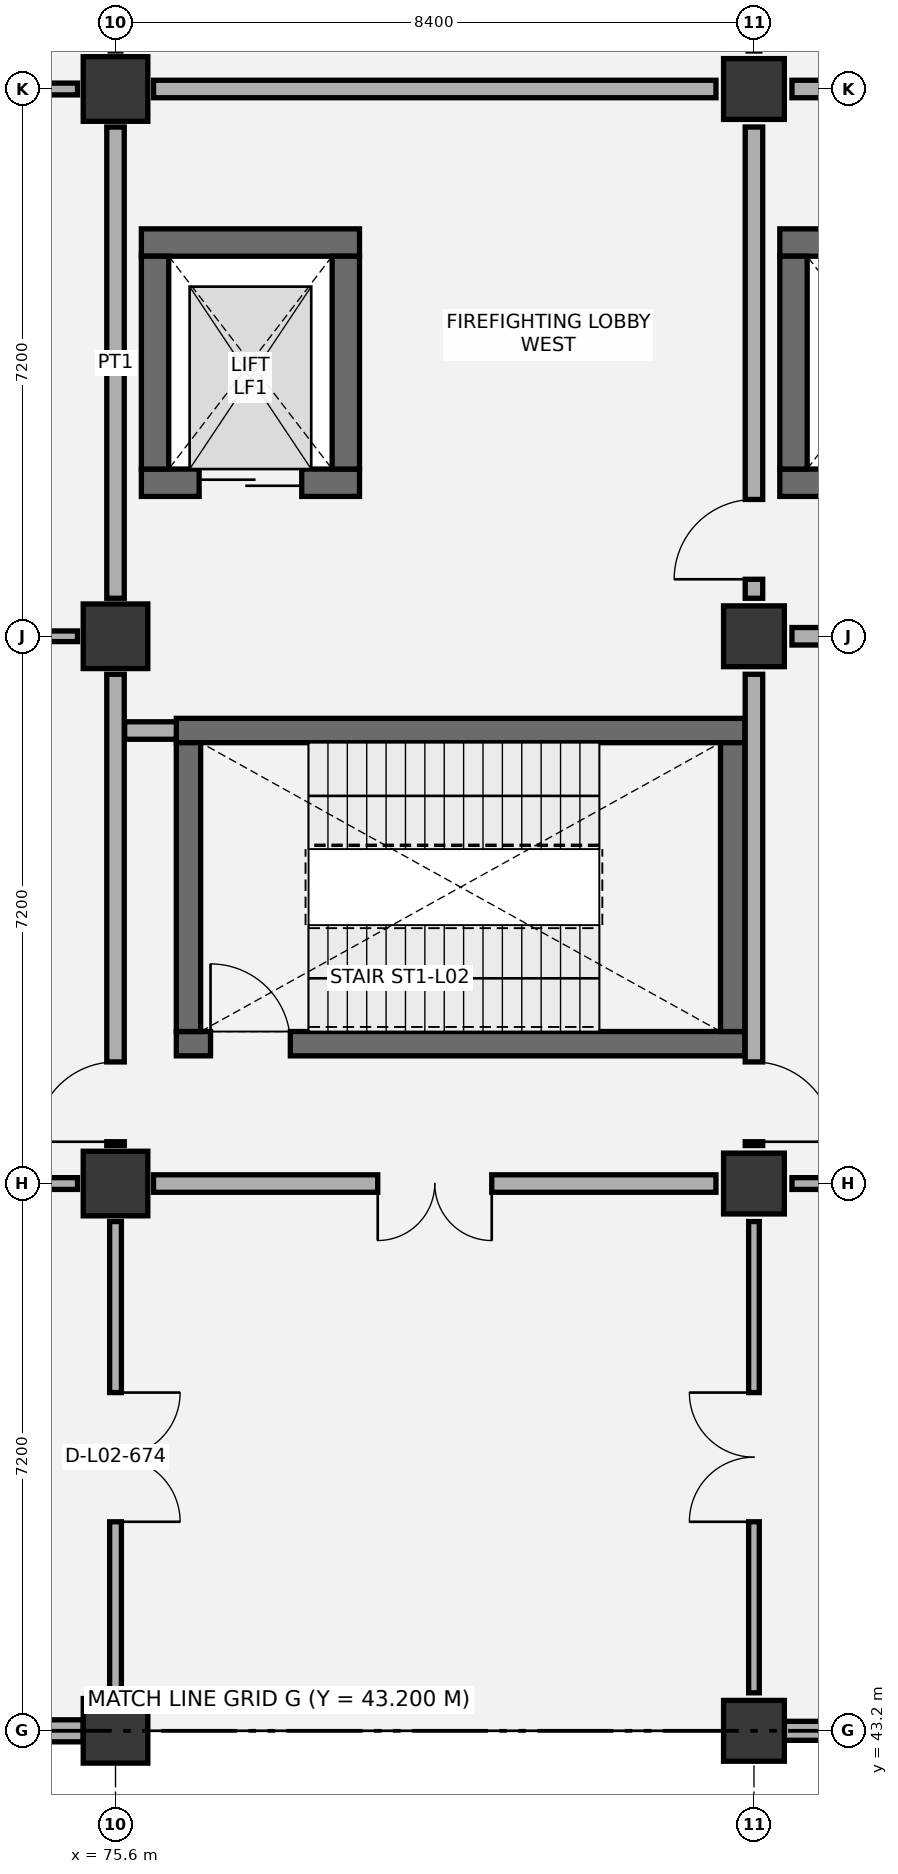
"""IFC4 building model, lengths in metres.
Left out: names, types, materials, properties, quantities, classifications, styles, units other than length and angle.
Written with IfcOpenShell. Run it as: python <this file> out.ifc"""

import sys

from ifc_helpers import new_model, si_unit, direction, frame, frame_2d, origin, origin_2d, place, context, subcontext, project, spatial, rectangle, extrude, element, fill, save


model = new_model("IFC4")
c1 = context("Model", 3, precision=1e-05, world=origin(), true_north=direction((0.0, 1.0)))
c2 = subcontext(c1, "Body", "Model", "MODEL_VIEW")
j1 = project(units=[si_unit("LENGTHUNIT", "METRE"), si_unit("PLANEANGLEUNIT", "RADIAN")], contexts=[c1])
p1 = place(None, origin())
s1 = spatial("IfcSite", under=j1, at=p1, CompositionType="ELEMENT")
p2 = place(p1, origin())
s2 = spatial("IfcBuilding", under=s1, at=p2, CompositionType="ELEMENT")
p3 = place(p2, frame((0.0, 0.0, 11.4)))
s3 = spatial("IfcBuildingStorey", under=s2, at=p3, CompositionType="ELEMENT", Elevation=11.4)
for number, where, z_axis, x_axis in (
    (1, (75.6, 43.2, 0.0), (0.0, 0.0, 1.0), (1.0, 0.0, 0.0)),
    (2, (75.6, 50.4, 0.0), (0.0, 0.0, 1.0), (1.0, 0.0, 0.0)),
    (3, (75.6, 57.6, 0.0), (0.0, 0.0, 1.0), (1.0, 0.0, 0.0)),
    (4, (75.6, 64.8, 0.0), (0.0, 0.0, 1.0), (1.0, 0.0, 0.0)),
):
    element("IfcColumn", number, at=place(p3, frame(where, z_axis=z_axis, x_axis=x_axis)), inside=s3, PredefinedType="COLUMN", context=c2, shape_type="SweptSolid", body=[
        extrude(rectangle(XDim=0.85, YDim=0.85, at=origin_2d()), origin(), (0.0, 0.0, 1.0), 5.4),
    ])
for number, where, z_axis, x_axis in (
    (5, (84.0, 43.2, 0.0), (0.0, 0.0, 1.0), (1.0, 0.0, 0.0)),
    (6, (84.0, 50.4, 0.0), (0.0, 0.0, 1.0), (1.0, 0.0, 0.0)),
    (7, (84.0, 57.6, 0.0), (0.0, 0.0, 1.0), (1.0, 0.0, 0.0)),
    (8, (84.0, 64.8, 0.0), (0.0, 0.0, 1.0), (1.0, 0.0, 0.0)),
):
    element("IfcColumn", number, at=place(p3, frame(where, z_axis=z_axis, x_axis=x_axis)), inside=s3, PredefinedType="COLUMN", context=c2, shape_type="SweptSolid", body=[
        extrude(rectangle(XDim=0.8, YDim=0.8, at=origin_2d()), origin(), (0.0, 0.0, 1.0), 5.4),
    ])
p4 = place(p3, frame((76.4, 52.24, 0.0), z_axis=(0.0, 0.0, 1.0), x_axis=(1.0, 0.0, 0.0)))
e9 = element("IfcWall", 9, at=p4, inside=s3, PredefinedType="SHEAR", context=c2, shape_type="SweptSolid", body=[
    extrude(rectangle(XDim=7.48, YDim=0.32, at=frame_2d((3.74, 0.0))), origin(), (0.0, 0.0, 1.0), 5.1),
])
p5 = place(p4, frame((0.45, 0.0, 0.0)))
e10 = element("IfcOpeningElement", 10, at=p5, cuts=e9, PredefinedType="OPENING", context=c2, shape_type="SweptSolid", body=[
    extrude(rectangle(XDim=1.05, YDim=2.15, at=frame_2d((0.525, 1.075))), frame((0.0, 0.17, 0.0), z_axis=(0.0, -1.0, 0.0), x_axis=(1.0, 0.0, 0.0)), (0.0, 0.0, 1.0), 0.34),
])
p6 = place(p3, frame((76.4, 56.36, 0.0), z_axis=(0.0, 0.0, 1.0), x_axis=(1.0, 0.0, 0.0)))
e11 = element("IfcWall", 11, at=p6, inside=s3, PredefinedType="SHEAR", context=c2, shape_type="SweptSolid", body=[
    extrude(rectangle(XDim=7.48, YDim=0.32, at=frame_2d((3.74, 0.0))), origin(), (0.0, 0.0, 1.0), 5.1),
])
for number, where, z_axis, x_axis in (
    (12, (76.56, 52.4, 0.0), (0.0, 0.0, 1.0), (0.0, 1.0, 0.0)),
    (13, (83.72, 52.4, 0.0), (0.0, 0.0, 1.0), (0.0, 1.0, 0.0)),
):
    element("IfcWall", number, at=place(p3, frame(where, z_axis=z_axis, x_axis=x_axis)), inside=s3, PredefinedType="SHEAR", context=c2, shape_type="SweptSolid", body=[
        extrude(rectangle(XDim=3.8, YDim=0.32, at=frame_2d((1.9, 0.0))), origin(), (0.0, 0.0, 1.0), 5.1),
    ])
p7 = place(p3, frame((75.94, 62.78, 0.0), z_axis=(0.0, 0.0, 1.0), x_axis=(1.0, 0.0, 0.0)))
e14 = element("IfcWall", 14, at=p7, inside=s3, PredefinedType="SHEAR", context=c2, shape_type="SweptSolid", body=[
    extrude(rectangle(XDim=2.87, YDim=0.36, at=frame_2d((1.435, 0.0))), origin(), (0.0, 0.0, 1.0), 5.1),
])
p8 = place(p3, frame((75.94, 59.62, 0.0), z_axis=(0.0, 0.0, 1.0), x_axis=(1.0, 0.0, 0.0)))
e15 = element("IfcWall", 15, at=p8, inside=s3, PredefinedType="SHEAR", context=c2, shape_type="SweptSolid", body=[
    extrude(rectangle(XDim=2.87, YDim=0.36, at=frame_2d((1.435, 0.0))), origin(), (0.0, 0.0, 1.0), 5.1),
])
p9 = place(p8, frame((0.76, 0.0, 0.0)))
e16 = element("IfcOpeningElement", 16, at=p9, cuts=e15, PredefinedType="OPENING", context=c2, shape_type="SweptSolid", body=[
    extrude(rectangle(XDim=1.35, YDim=2.2, at=frame_2d((0.675, 1.1))), frame((0.0, 0.19, 0.0), z_axis=(0.0, -1.0, 0.0), x_axis=(1.0, 0.0, 0.0)), (0.0, 0.0, 1.0), 0.38),
])
for number, where, z_axis, x_axis in (
    (17, (76.12, 59.8, 0.0), (0.0, 0.0, 1.0), (0.0, 1.0, 0.0)),
    (18, (78.63, 59.8, 0.0), (0.0, 0.0, 1.0), (0.0, 1.0, 0.0)),
):
    element("IfcWall", number, at=place(p3, frame(where, z_axis=z_axis, x_axis=x_axis)), inside=s3, PredefinedType="SHEAR", context=c2, shape_type="SweptSolid", body=[
        extrude(rectangle(XDim=2.8, YDim=0.36, at=frame_2d((1.4, 0.0))), origin(), (0.0, 0.0, 1.0), 5.1),
    ])
p10 = place(p3, frame((84.34, 62.78, 0.0), z_axis=(0.0, 0.0, 1.0), x_axis=(1.0, 0.0, 0.0)))
e19 = element("IfcWall", 19, at=p10, inside=s3, PredefinedType="SHEAR", context=c2, shape_type="SweptSolid", body=[
    extrude(rectangle(XDim=7.77, YDim=0.36, at=frame_2d((3.885, 0.0))), origin(), (0.0, 0.0, 1.0), 5.1),
])
p11 = place(p3, frame((84.34, 59.62, 0.0), z_axis=(0.0, 0.0, 1.0), x_axis=(1.0, 0.0, 0.0)))
e20 = element("IfcWall", 20, at=p11, inside=s3, PredefinedType="SHEAR", context=c2, shape_type="SweptSolid", body=[
    extrude(rectangle(XDim=2.66, YDim=0.36, at=frame_2d((1.33, 0.0))), origin(), (0.0, 0.0, 1.0), 5.1),
])
p12 = place(p11, frame((0.78, 0.0, 0.0)))
e21 = element("IfcOpeningElement", 21, at=p12, cuts=e20, PredefinedType="OPENING", context=c2, shape_type="SweptSolid", body=[
    extrude(rectangle(XDim=1.1, YDim=2.15, at=frame_2d((0.55, 1.075))), frame((0.0, 0.19, 0.0), z_axis=(0.0, -1.0, 0.0), x_axis=(1.0, 0.0, 0.0)), (0.0, 0.0, 1.0), 0.38),
])
p13 = place(p3, frame((84.52, 59.8, 0.0), z_axis=(0.0, 0.0, 1.0), x_axis=(0.0, 1.0, 0.0)))
e22 = element("IfcWall", 22, at=p13, inside=s3, PredefinedType="SHEAR", context=c2, shape_type="SweptSolid", body=[
    extrude(rectangle(XDim=2.8, YDim=0.36, at=frame_2d((1.4, 0.0))), origin(), (0.0, 0.0, 1.0), 5.1),
])
p14 = place(p3, frame((67.6, 43.2, 0.0), z_axis=(0.0, 0.0, 1.0), x_axis=(1.0, 0.0, 0.0)))
e23 = element("IfcWall", 23, at=p14, inside=s3, PredefinedType="SOLIDWALL", context=c2, shape_type="SweptSolid", body=[
    extrude(rectangle(XDim=7.575, YDim=0.29, at=frame_2d((3.788, 0.0))), origin(), (0.0, 0.0, 1.0), 4.445),
])
p15 = place(p14, frame((0.925, 0.0, 0.9)))
e24 = element("IfcOpeningElement", 24, at=p15, cuts=e23, PredefinedType="OPENING", context=c2, shape_type="SweptSolid", body=[
    extrude(rectangle(XDim=2.4, YDim=2.1, at=frame_2d((1.2, 1.05))), frame((0.0, 0.155, 0.0), z_axis=(0.0, -1.0, 0.0), x_axis=(1.0, 0.0, 0.0)), (0.0, 0.0, 1.0), 0.31),
])
p16 = place(p14, frame((4.25, 0.0, 0.9)))
e25 = element("IfcOpeningElement", 25, at=p16, cuts=e23, PredefinedType="OPENING", context=c2, shape_type="SweptSolid", body=[
    extrude(rectangle(XDim=2.4, YDim=2.1, at=frame_2d((1.2, 1.05))), frame((0.0, 0.155, 0.0), z_axis=(0.0, -1.0, 0.0), x_axis=(1.0, 0.0, 0.0)), (0.0, 0.0, 1.0), 0.31),
])
p17 = place(p3, frame((84.4, 43.2, 0.0), z_axis=(0.0, 0.0, 1.0), x_axis=(1.0, 0.0, 0.0)))
e26 = element("IfcWall", 26, at=p17, inside=s3, PredefinedType="SOLIDWALL", context=c2, shape_type="SweptSolid", body=[
    extrude(rectangle(XDim=7.6, YDim=0.25, at=frame_2d((3.8, 0.0))), origin(), (0.0, 0.0, 1.0), 4.445),
])
p18 = place(p17, frame((2.3, 0.0, 0.9)))
e27 = element("IfcOpeningElement", 27, at=p18, cuts=e26, PredefinedType="OPENING", context=c2, shape_type="SweptSolid", body=[
    extrude(rectangle(XDim=3.0, YDim=2.1, at=frame_2d((1.5, 1.05))), frame((0.0, 0.135, 0.0), z_axis=(0.0, -1.0, 0.0), x_axis=(1.0, 0.0, 0.0)), (0.0, 0.0, 1.0), 0.27),
])
p19 = place(p3, frame((75.6, 43.7, 0.0), z_axis=(0.0, 0.0, 1.0), x_axis=(0.0, 1.0, 0.0)))
e28 = element("IfcWall", 28, at=p19, inside=s3, PredefinedType="PARTITIONING", context=c2, shape_type="SweptSolid", body=[
    extrude(rectangle(XDim=6.2, YDim=0.155, at=frame_2d((3.1, 0.0))), origin(), (0.0, 0.0, 1.0), 4.395),
])
p20 = place(p19, frame((2.25, 0.0, 0.0)))
e29 = element("IfcOpeningElement", 29, at=p20, cuts=e28, PredefinedType="OPENING", context=c2, shape_type="SweptSolid", body=[
    extrude(rectangle(XDim=1.7, YDim=2.25, at=frame_2d((0.85, 1.125))), frame((0.0, 0.087, 0.0), z_axis=(0.0, -1.0, 0.0), x_axis=(1.0, 0.0, 0.0)), (0.0, 0.0, 1.0), 0.175),
])
p21 = place(p3, frame((67.7, 50.4, 0.0), z_axis=(0.0, 0.0, 1.0), x_axis=(1.0, 0.0, 0.0)))
e30 = element("IfcWall", 30, at=p21, inside=s3, PredefinedType="PARTITIONING", context=c2, shape_type="SweptSolid", body=[
    extrude(rectangle(XDim=7.4, YDim=0.155, at=frame_2d((3.7, 0.0))), origin(), (0.0, 0.0, 1.0), 4.345),
])
p22 = place(p21, frame((3.0, 0.0, 0.0)))
e31 = element("IfcOpeningElement", 31, at=p22, cuts=e30, PredefinedType="OPENING", context=c2, shape_type="SweptSolid", body=[
    extrude(rectangle(XDim=1.4, YDim=2.15, at=frame_2d((0.7, 1.075))), frame((0.0, 0.087, 0.0), z_axis=(0.0, -1.0, 0.0), x_axis=(1.0, 0.0, 0.0)), (0.0, 0.0, 1.0), 0.175),
])
p23 = place(p3, frame((75.6, 50.9, 0.0), z_axis=(0.0, 0.0, 1.0), x_axis=(0.0, 1.0, 0.0)))
e32 = element("IfcWall", 32, at=p23, inside=s3, PredefinedType="PARTITIONING", context=c2, shape_type="SweptSolid", body=[
    extrude(rectangle(XDim=6.2, YDim=0.23, at=frame_2d((3.1, 0.0))), origin(), (0.0, 0.0, 1.0), 4.695),
])
p24 = place(p23, frame((0.05, 0.0, 0.0)))
e33 = element("IfcOpeningElement", 33, at=p24, cuts=e32, PredefinedType="OPENING", context=c2, shape_type="SweptSolid", body=[
    extrude(rectangle(XDim=1.05, YDim=2.15, at=frame_2d((0.525, 1.075))), frame((0.0, 0.125, 0.0), z_axis=(0.0, -1.0, 0.0), x_axis=(1.0, 0.0, 0.0)), (0.0, 0.0, 1.0), 0.25),
])
p25 = place(p3, frame((67.7, 57.6, 0.0), z_axis=(0.0, 0.0, 1.0), x_axis=(1.0, 0.0, 0.0)))
e34 = element("IfcWall", 34, at=p25, inside=s3, PredefinedType="PARTITIONING", context=c2, shape_type="SweptSolid", body=[
    extrude(rectangle(XDim=7.4, YDim=0.14, at=frame_2d((3.7, 0.0))), origin(), (0.0, 0.0, 1.0), 4.345),
])
p26 = place(p25, frame((3.0, 0.0, 0.0)))
e35 = element("IfcOpeningElement", 35, at=p26, cuts=e34, PredefinedType="OPENING", context=c2, shape_type="SweptSolid", body=[
    extrude(rectangle(XDim=1.4, YDim=2.15, at=frame_2d((0.7, 1.075))), frame((0.0, 0.08, 0.0), z_axis=(0.0, -1.0, 0.0), x_axis=(1.0, 0.0, 0.0)), (0.0, 0.0, 1.0), 0.16),
])
p27 = place(p3, frame((75.6, 58.1, 0.0), z_axis=(0.0, 0.0, 1.0), x_axis=(0.0, 1.0, 0.0)))
e36 = element("IfcWall", 36, at=p27, inside=s3, PredefinedType="PARTITIONING", context=c2, shape_type="SweptSolid", body=[
    extrude(rectangle(XDim=6.2, YDim=0.23, at=frame_2d((3.1, 0.0))), origin(), (0.0, 0.0, 1.0), 4.395),
])
p28 = place(p3, frame((67.7, 64.8, 0.0), z_axis=(0.0, 0.0, 1.0), x_axis=(1.0, 0.0, 0.0)))
e37 = element("IfcWall", 37, at=p28, inside=s3, PredefinedType="PARTITIONING", context=c2, shape_type="SweptSolid", body=[
    extrude(rectangle(XDim=7.4, YDim=0.155, at=frame_2d((3.7, 0.0))), origin(), (0.0, 0.0, 1.0), 4.345),
])
p29 = place(p28, frame((2.85, 0.0, 0.0)))
e38 = element("IfcOpeningElement", 38, at=p29, cuts=e37, PredefinedType="OPENING", context=c2, shape_type="SweptSolid", body=[
    extrude(rectangle(XDim=1.7, YDim=2.25, at=frame_2d((0.85, 1.125))), frame((0.0, 0.087, 0.0), z_axis=(0.0, -1.0, 0.0), x_axis=(1.0, 0.0, 0.0)), (0.0, 0.0, 1.0), 0.175),
])
p30 = place(p3, frame((84.0, 43.7, 0.0), z_axis=(0.0, 0.0, 1.0), x_axis=(0.0, 1.0, 0.0)))
e39 = element("IfcWall", 39, at=p30, inside=s3, PredefinedType="PARTITIONING", context=c2, shape_type="SweptSolid", body=[
    extrude(rectangle(XDim=6.2, YDim=0.14, at=frame_2d((3.1, 0.0))), origin(), (0.0, 0.0, 1.0), 4.695),
])
p31 = place(p30, frame((2.25, 0.0, 0.0)))
e40 = element("IfcOpeningElement", 40, at=p31, cuts=e39, PredefinedType="OPENING", context=c2, shape_type="SweptSolid", body=[
    extrude(rectangle(XDim=1.7, YDim=2.25, at=frame_2d((0.85, 1.125))), frame((0.0, 0.08, 0.0), z_axis=(0.0, -1.0, 0.0), x_axis=(1.0, 0.0, 0.0)), (0.0, 0.0, 1.0), 0.16),
])
p32 = place(p3, frame((76.1, 50.4, 0.0), z_axis=(0.0, 0.0, 1.0), x_axis=(1.0, 0.0, 0.0)))
e41 = element("IfcWall", 41, at=p32, inside=s3, PredefinedType="PARTITIONING", context=c2, shape_type="SweptSolid", body=[
    extrude(rectangle(XDim=7.4, YDim=0.23, at=frame_2d((3.7, 0.0))), origin(), (0.0, 0.0, 1.0), 4.345),
])
p33 = place(p32, frame((2.95, 0.0, 0.0)))
e42 = element("IfcOpeningElement", 42, at=p33, cuts=e41, PredefinedType="OPENING", context=c2, shape_type="SweptSolid", body=[
    extrude(rectangle(XDim=1.5, YDim=2.15, at=frame_2d((0.75, 1.075))), frame((0.0, 0.125, 0.0), z_axis=(0.0, -1.0, 0.0), x_axis=(1.0, 0.0, 0.0)), (0.0, 0.0, 1.0), 0.25),
])
p34 = place(p3, frame((84.0, 50.9, 0.0), z_axis=(0.0, 0.0, 1.0), x_axis=(0.0, 1.0, 0.0)))
e43 = element("IfcWall", 43, at=p34, inside=s3, PredefinedType="PARTITIONING", context=c2, shape_type="SweptSolid", body=[
    extrude(rectangle(XDim=6.2, YDim=0.23, at=frame_2d((3.1, 0.0))), origin(), (0.0, 0.0, 1.0), 4.395),
])
p35 = place(p34, frame((0.05, 0.0, 0.0)))
e44 = element("IfcOpeningElement", 44, at=p35, cuts=e43, PredefinedType="OPENING", context=c2, shape_type="SweptSolid", body=[
    extrude(rectangle(XDim=1.05, YDim=2.15, at=frame_2d((0.525, 1.075))), frame((0.0, 0.125, 0.0), z_axis=(0.0, -1.0, 0.0), x_axis=(1.0, 0.0, 0.0)), (0.0, 0.0, 1.0), 0.25),
])
p36 = place(p3, frame((75.72, 56.36, 0.0), z_axis=(0.0, 0.0, 1.0), x_axis=(1.0, 0.0, 0.0)))
e45 = element("IfcWall", 45, at=p36, inside=s3, PredefinedType="PARTITIONING", context=c2, shape_type="SweptSolid", body=[
    extrude(rectangle(XDim=0.68, YDim=0.23, at=frame_2d((0.34, 0.0))), origin(), (0.0, 0.0, 1.0), 5.1),
])
p37 = place(p3, frame((84.0, 58.1, 0.0), z_axis=(0.0, 0.0, 1.0), x_axis=(0.0, 1.0, 0.0)))
e46 = element("IfcWall", 46, at=p37, inside=s3, PredefinedType="PARTITIONING", context=c2, shape_type="SweptSolid", body=[
    extrude(rectangle(XDim=6.2, YDim=0.23, at=frame_2d((3.1, 0.0))), origin(), (0.0, 0.0, 1.0), 4.805),
])
p38 = place(p37, frame((0.25, 0.0, 0.0)))
e47 = element("IfcOpeningElement", 47, at=p38, cuts=e46, PredefinedType="OPENING", context=c2, shape_type="SweptSolid", body=[
    extrude(rectangle(XDim=1.05, YDim=2.15, at=frame_2d((0.525, 1.075))), frame((0.0, 0.125, 0.0), z_axis=(0.0, -1.0, 0.0), x_axis=(1.0, 0.0, 0.0)), (0.0, 0.0, 1.0), 0.25),
])
p39 = place(p3, frame((76.1, 64.8, 0.0), z_axis=(0.0, 0.0, 1.0), x_axis=(1.0, 0.0, 0.0)))
e48 = element("IfcWall", 48, at=p39, inside=s3, PredefinedType="PARTITIONING", context=c2, shape_type="SweptSolid", body=[
    extrude(rectangle(XDim=7.4, YDim=0.23, at=frame_2d((3.7, 0.0))), origin(), (0.0, 0.0, 1.0), 4.345),
])
p40 = place(p3, frame((84.5, 50.4, 0.0), z_axis=(0.0, 0.0, 1.0), x_axis=(1.0, 0.0, 0.0)))
e49 = element("IfcWall", 49, at=p40, inside=s3, PredefinedType="PARTITIONING", context=c2, shape_type="SweptSolid", body=[
    extrude(rectangle(XDim=7.4, YDim=0.155, at=frame_2d((3.7, 0.0))), origin(), (0.0, 0.0, 1.0), 4.345),
])
p41 = place(p40, frame((2.85, 0.0, 0.0)))
e50 = element("IfcOpeningElement", 50, at=p41, cuts=e49, PredefinedType="OPENING", context=c2, shape_type="SweptSolid", body=[
    extrude(rectangle(XDim=1.7, YDim=2.25, at=frame_2d((0.85, 1.125))), frame((0.0, 0.087, 0.0), z_axis=(0.0, -1.0, 0.0), x_axis=(1.0, 0.0, 0.0)), (0.0, 0.0, 1.0), 0.175),
])
p42 = place(p3, frame((84.5, 57.6, 0.0), z_axis=(0.0, 0.0, 1.0), x_axis=(1.0, 0.0, 0.0)))
e51 = element("IfcWall", 51, at=p42, inside=s3, PredefinedType="PARTITIONING", context=c2, shape_type="SweptSolid", body=[
    extrude(rectangle(XDim=7.4, YDim=0.23, at=frame_2d((3.7, 0.0))), origin(), (0.0, 0.0, 1.0), 4.345),
])
p43 = place(p42, frame((2.95, 0.0, 0.0)))
e52 = element("IfcOpeningElement", 52, at=p43, cuts=e51, PredefinedType="OPENING", context=c2, shape_type="SweptSolid", body=[
    extrude(rectangle(XDim=1.5, YDim=2.15, at=frame_2d((0.75, 1.075))), frame((0.0, 0.125, 0.0), z_axis=(0.0, -1.0, 0.0), x_axis=(1.0, 0.0, 0.0)), (0.0, 0.0, 1.0), 0.25),
])
p44 = place(p3, frame((84.5, 64.8, 0.0), z_axis=(0.0, 0.0, 1.0), x_axis=(1.0, 0.0, 0.0)))
e53 = element("IfcWall", 53, at=p44, inside=s3, PredefinedType="PARTITIONING", context=c2, shape_type="SweptSolid", body=[
    extrude(rectangle(XDim=7.4, YDim=0.23, at=frame_2d((3.7, 0.0))), origin(), (0.0, 0.0, 1.0), 4.345),
])
p45 = place(p5, origin())
e54 = element("IfcDoor", 54, at=p45, inside=s3, OperationType="SINGLE_SWING_LEFT", PredefinedType="DOOR", context=c2, shape_type="SweptSolid", body=[
    extrude(rectangle(XDim=1.05, YDim=2.15, at=frame_2d((0.525, 1.075))), frame((0.0, 0.025, 0.0), z_axis=(0.0, -1.0, 0.0), x_axis=(1.0, 0.0, 0.0)), (0.0, 0.0, 1.0), 0.05),
])
fill(e10, e54)
p46 = place(p9, origin())
e55 = element("IfcDoor", 55, at=p46, inside=s3, OperationType="DOUBLE_DOOR_SLIDING", PredefinedType="DOOR", context=c2, shape_type="SweptSolid", body=[
    extrude(rectangle(XDim=1.35, YDim=2.2, at=frame_2d((0.675, 1.1))), frame((0.0, 0.025, 0.0), z_axis=(0.0, -1.0, 0.0), x_axis=(1.0, 0.0, 0.0)), (0.0, 0.0, 1.0), 0.05),
])
fill(e16, e55)
p47 = place(p20, frame((1.7, 0.0, 0.0), z_axis=(0.0, 0.0, 1.0), x_axis=(-1.0, 0.0, 0.0)))
e56 = element("IfcDoor", 56, at=p47, inside=s3, OperationType="DOUBLE_DOOR_SINGLE_SWING", PredefinedType="DOOR", context=c2, shape_type="SweptSolid", body=[
    extrude(rectangle(XDim=1.7, YDim=2.25, at=frame_2d((0.85, 1.125))), frame((0.0, 0.025, 0.0), z_axis=(0.0, -1.0, 0.0), x_axis=(1.0, 0.0, 0.0)), (0.0, 0.0, 1.0), 0.05),
])
fill(e29, e56)
p48 = place(p24, origin())
e57 = element("IfcDoor", 57, at=p48, inside=s3, OperationType="SINGLE_SWING_LEFT", PredefinedType="DOOR", context=c2, shape_type="SweptSolid", body=[
    extrude(rectangle(XDim=1.05, YDim=2.15, at=frame_2d((0.525, 1.075))), frame((0.0, 0.025, 0.0), z_axis=(0.0, -1.0, 0.0), x_axis=(1.0, 0.0, 0.0)), (0.0, 0.0, 1.0), 0.05),
])
fill(e33, e57)
p49 = place(p31, origin())
e58 = element("IfcDoor", 58, at=p49, inside=s3, OperationType="DOUBLE_DOOR_SINGLE_SWING", PredefinedType="DOOR", context=c2, shape_type="SweptSolid", body=[
    extrude(rectangle(XDim=1.7, YDim=2.25, at=frame_2d((0.85, 1.125))), frame((0.0, 0.025, 0.0), z_axis=(0.0, -1.0, 0.0), x_axis=(1.0, 0.0, 0.0)), (0.0, 0.0, 1.0), 0.05),
])
fill(e40, e58)
p50 = place(p33, frame((1.5, 0.0, 0.0), z_axis=(0.0, 0.0, 1.0), x_axis=(-1.0, 0.0, 0.0)))
e59 = element("IfcDoor", 59, at=p50, inside=s3, OperationType="DOUBLE_DOOR_SINGLE_SWING", PredefinedType="DOOR", context=c2, shape_type="SweptSolid", body=[
    extrude(rectangle(XDim=1.5, YDim=2.15, at=frame_2d((0.75, 1.075))), frame((0.0, 0.025, 0.0), z_axis=(0.0, -1.0, 0.0), x_axis=(1.0, 0.0, 0.0)), (0.0, 0.0, 1.0), 0.05),
])
fill(e42, e59)
p51 = place(p35, frame((1.05, 0.0, 0.0), z_axis=(0.0, 0.0, 1.0), x_axis=(-1.0, 0.0, 0.0)))
e60 = element("IfcDoor", 60, at=p51, inside=s3, OperationType="SINGLE_SWING_RIGHT", PredefinedType="DOOR", context=c2, shape_type="SweptSolid", body=[
    extrude(rectangle(XDim=1.05, YDim=2.15, at=frame_2d((0.525, 1.075))), frame((0.0, 0.025, 0.0), z_axis=(0.0, -1.0, 0.0), x_axis=(1.0, 0.0, 0.0)), (0.0, 0.0, 1.0), 0.05),
])
fill(e44, e60)
p52 = place(p38, origin())
e61 = element("IfcDoor", 61, at=p52, inside=s3, OperationType="SINGLE_SWING_LEFT", PredefinedType="DOOR", context=c2, shape_type="SweptSolid", body=[
    extrude(rectangle(XDim=1.05, YDim=2.15, at=frame_2d((0.525, 1.075))), frame((0.0, 0.025, 0.0), z_axis=(0.0, -1.0, 0.0), x_axis=(1.0, 0.0, 0.0)), (0.0, 0.0, 1.0), 0.05),
])
fill(e47, e61)
save(model, sys.argv[1])
